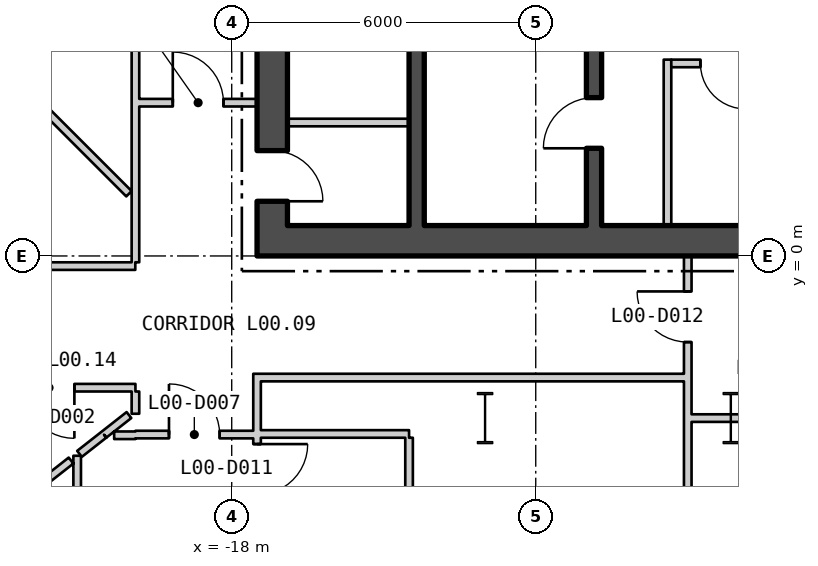
"""IFC4 building model, lengths in metres.
Left out: names, types, materials, properties, quantities, classifications, styles, units other than length and angle.
Written with IfcOpenShell. Run it as: python <this file> out.ifc"""

import sys

from ifc_helpers import new_model, si_unit, direction, frame, frame_2d, origin, origin_2d, place, context, subcontext, project, spatial, rectangle, i_section, extrude, element, fill, save


model = new_model("IFC4")
c1 = context("Model", 3, precision=1e-05, world=origin(), true_north=direction((0.0, 1.0)))
c2 = subcontext(c1, "Body", "Model", "MODEL_VIEW")
j1 = project(units=[si_unit("LENGTHUNIT", "METRE"), si_unit("PLANEANGLEUNIT", "RADIAN")], contexts=[c1])
p1 = place(None, origin())
s1 = spatial("IfcSite", under=j1, at=p1, CompositionType="ELEMENT")
p2 = place(p1, origin())
s2 = spatial("IfcBuilding", under=s1, at=p2, CompositionType="ELEMENT")
p3 = place(p2, origin())
s3 = spatial("IfcBuildingStorey", under=s2, at=p3, CompositionType="ELEMENT", Elevation=0.0)
for number, where, z_axis, x_axis in (
    (1, (-8.15, -3.2, 0.0), (0.0, 0.0, 1.0), (1.0, 0.0, 0.0)),
    (2, (-13.0, -3.2, 0.0), (0.0, 0.0, 1.0), (1.0, 0.0, 0.0)),
):
    element("IfcColumn", number, at=place(p3, frame(where, z_axis=z_axis, x_axis=x_axis)), inside=s3, PredefinedType="COLUMN", context=c2, shape_type="SweptSolid", body=[
        extrude(i_section(OverallWidth=0.302, OverallDepth=1.008, WebThickness=0.021, FlangeThickness=0.04, at=origin_2d()), origin(), (0.0, 0.0, 1.0), 8.4),
    ])
p4 = place(p3, frame((-17.5, 0.3, 0.0), z_axis=(0.0, 0.0, 1.0), x_axis=(1.0, 0.0, 0.0)))
e3 = element("IfcWall", 3, at=p4, inside=s3, PredefinedType="SHEAR", context=c2, shape_type="SweptSolid", body=[
    extrude(rectangle(XDim=35.0, YDim=0.6, at=frame_2d((17.5, 0.0))), origin(), (0.0, 0.0, 1.0), 8.18),
])
p5 = place(p4, frame((12.0, 0.0, 0.0)))
e4 = element("IfcOpeningElement", 4, at=p5, cuts=e3, PredefinedType="OPENING", context=c2, shape_type="SweptSolid", body=[
    extrude(rectangle(XDim=1.8, YDim=2.4, at=frame_2d((0.9, 1.2))), frame((0.0, 0.31, 0.0), z_axis=(0.0, -1.0, 0.0), x_axis=(1.0, 0.0, 0.0)), (0.0, 0.0, 1.0), 0.62),
])
p6 = place(p4, frame((22.0, 0.0, 0.0)))
e5 = element("IfcOpeningElement", 5, at=p6, cuts=e3, PredefinedType="OPENING", context=c2, shape_type="SweptSolid", body=[
    extrude(rectangle(XDim=1.8, YDim=2.4, at=frame_2d((0.9, 1.2))), frame((0.0, 0.31, 0.0), z_axis=(0.0, -1.0, 0.0), x_axis=(1.0, 0.0, 0.0)), (0.0, 0.0, 1.0), 0.62),
])
p7 = place(p3, frame((-17.2, 0.6, 0.0), z_axis=(0.0, 0.0, 1.0), x_axis=(0.0, 1.0, 0.0)))
e6 = element("IfcWall", 6, at=p7, inside=s3, PredefinedType="SHEAR", context=c2, shape_type="SweptSolid", body=[
    extrude(rectangle(XDim=16.8, YDim=0.6, at=frame_2d((8.4, 0.0))), origin(), (0.0, 0.0, 1.0), 8.18),
])
p8 = place(p7, frame((7.1, 0.0, 0.0)))
e7 = element("IfcOpeningElement", 7, at=p8, cuts=e6, PredefinedType="OPENING", context=c2, shape_type="SweptSolid", body=[
    extrude(rectangle(XDim=1.5, YDim=2.4, at=frame_2d((0.75, 1.2))), frame((0.0, 0.31, 0.0), z_axis=(0.0, -1.0, 0.0), x_axis=(1.0, 0.0, 0.0)), (0.0, 0.0, 1.0), 0.62),
])
p9 = place(p7, frame((9.525, 0.0, 0.0)))
e8 = element("IfcOpeningElement", 8, at=p9, cuts=e6, PredefinedType="OPENING", context=c2, shape_type="SweptSolid", body=[
    extrude(rectangle(XDim=1.5, YDim=2.4, at=frame_2d((0.75, 1.2))), frame((0.0, 0.31, 0.0), z_axis=(0.0, -1.0, 0.0), x_axis=(1.0, 0.0, 0.0)), (0.0, 0.0, 1.0), 0.62),
])
p10 = place(p7, frame((0.479, 0.0, 0.0)))
e9 = element("IfcOpeningElement", 9, at=p10, cuts=e6, PredefinedType="OPENING", context=c2, shape_type="SweptSolid", body=[
    extrude(rectangle(XDim=1.0, YDim=2.1, at=frame_2d((0.5, 1.05))), frame((0.0, 0.31, 0.0), z_axis=(0.0, -1.0, 0.0), x_axis=(1.0, 0.0, 0.0)), (0.0, 0.0, 1.0), 0.62),
])
p11 = place(p7, frame((4.079, 0.0, 0.0)))
e10 = element("IfcOpeningElement", 10, at=p11, cuts=e6, PredefinedType="OPENING", context=c2, shape_type="SweptSolid", body=[
    extrude(rectangle(XDim=0.9, YDim=2.1, at=frame_2d((0.45, 1.05))), frame((0.0, 0.31, 0.0), z_axis=(0.0, -1.0, 0.0), x_axis=(1.0, 0.0, 0.0)), (0.0, 0.0, 1.0), 0.62),
])
p12 = place(p7, frame((13.225, 0.0, 0.0)))
e11 = element("IfcOpeningElement", 11, at=p12, cuts=e6, PredefinedType="OPENING", context=c2, shape_type="SweptSolid", body=[
    extrude(rectangle(XDim=0.9, YDim=2.1, at=frame_2d((0.45, 1.05))), frame((0.0, 0.31, 0.0), z_axis=(0.0, -1.0, 0.0), x_axis=(1.0, 0.0, 0.0)), (0.0, 0.0, 1.0), 0.62),
])
p13 = place(p7, frame((15.238, 0.0, 0.0)))
e12 = element("IfcOpeningElement", 12, at=p13, cuts=e6, PredefinedType="OPENING", context=c2, shape_type="SweptSolid", body=[
    extrude(rectangle(XDim=0.9, YDim=2.1, at=frame_2d((0.45, 1.05))), frame((0.0, 0.31, 0.0), z_axis=(0.0, -1.0, 0.0), x_axis=(1.0, 0.0, 0.0)), (0.0, 0.0, 1.0), 0.62),
])
p14 = place(p3, frame((-10.85, 0.6, 0.0), z_axis=(0.0, 0.0, 1.0), x_axis=(0.0, 1.0, 0.0)))
e13 = element("IfcWall", 13, at=p14, inside=s3, PredefinedType="SHEAR", context=c2, shape_type="SweptSolid", body=[
    extrude(rectangle(XDim=16.8, YDim=0.3, at=frame_2d((8.4, 0.0))), origin(), (0.0, 0.0, 1.0), 8.18),
])
p15 = place(p14, frame((1.525, 0.0, 0.0)))
e14 = element("IfcOpeningElement", 14, at=p15, cuts=e13, PredefinedType="OPENING", context=c2, shape_type="SweptSolid", body=[
    extrude(rectangle(XDim=1.0, YDim=2.1, at=frame_2d((0.5, 1.05))), frame((0.0, 0.16, 0.0), z_axis=(0.0, -1.0, 0.0), x_axis=(1.0, 0.0, 0.0)), (0.0, 0.0, 1.0), 0.32),
])
p16 = place(p3, frame((-14.35, 0.6, 0.0), z_axis=(0.0, 0.0, 1.0), x_axis=(0.0, 1.0, 0.0)))
e15 = element("IfcWall", 15, at=p16, inside=s3, PredefinedType="SHEAR", context=c2, shape_type="SweptSolid", body=[
    extrude(rectangle(XDim=16.8, YDim=0.3, at=frame_2d((8.4, 0.0))), origin(), (0.0, 0.0, 1.0), 8.18),
])
p17 = place(p16, frame((9.25, 0.0, 0.0)))
e16 = element("IfcOpeningElement", 16, at=p17, cuts=e15, PredefinedType="OPENING", context=c2, shape_type="SweptSolid", body=[
    extrude(rectangle(XDim=1.0, YDim=2.1, at=frame_2d((0.5, 1.05))), frame((0.0, 0.16, 0.0), z_axis=(0.0, -1.0, 0.0), x_axis=(1.0, 0.0, 0.0)), (0.0, 0.0, 1.0), 0.32),
])
p18 = place(p16, frame((7.1, 0.0, 0.0)))
e17 = element("IfcOpeningElement", 17, at=p18, cuts=e15, PredefinedType="OPENING", context=c2, shape_type="SweptSolid", body=[
    extrude(rectangle(XDim=1.5, YDim=2.4, at=frame_2d((0.75, 1.2))), frame((0.0, 0.16, 0.0), z_axis=(0.0, -1.0, 0.0), x_axis=(1.0, 0.0, 0.0)), (0.0, 0.0, 1.0), 0.32),
])
p19 = place(p3, frame((-16.9, 2.634, 0.0), z_axis=(0.0, 0.0, 1.0), x_axis=(1.0, 0.0, 0.0)))
e18 = element("IfcWall", 18, at=p19, inside=s3, PredefinedType="PARTITIONING", context=c2, shape_type="SweptSolid", body=[
    extrude(rectangle(XDim=2.4, YDim=0.15, at=frame_2d((1.2, 0.0))), origin(), (0.0, 0.0, 1.0), 8.18),
])
p20 = place(p3, frame((-9.4, 0.6, 0.0), z_axis=(0.0, 0.0, 1.0), x_axis=(0.0, 1.0, 0.0)))
e19 = element("IfcWall", 19, at=p20, inside=s3, PredefinedType="PARTITIONING", context=c2, shape_type="SweptSolid", body=[
    extrude(rectangle(XDim=3.275, YDim=0.15, at=frame_2d((1.637, 0.0))), origin(), (0.0, 0.0, 1.0), 8.18),
])
p21 = place(p3, frame((-9.325, 3.8, 0.0), z_axis=(0.0, 0.0, 1.0), x_axis=(1.0, 0.0, 0.0)))
e20 = element("IfcWall", 20, at=p21, inside=s3, PredefinedType="PARTITIONING", context=c2, shape_type="SweptSolid", body=[
    extrude(rectangle(XDim=2.05, YDim=0.15, at=frame_2d((1.025, 0.0))), origin(), (0.0, 0.0, 1.0), 8.18),
])
p22 = place(p21, frame((0.575, 0.0, 0.0)))
e21 = element("IfcOpeningElement", 21, at=p22, cuts=e20, PredefinedType="OPENING", context=c2, shape_type="SweptSolid", body=[
    extrude(rectangle(XDim=0.9, YDim=2.1, at=frame_2d((0.45, 1.05))), frame((0.0, 0.085, 0.0), z_axis=(0.0, -1.0, 0.0), x_axis=(1.0, 0.0, 0.0)), (0.0, 0.0, 1.0), 0.17),
])
p23 = place(p3, frame((-26.75, -2.6, 0.0), z_axis=(0.0, 0.0, 1.0), x_axis=(1.0, 0.0, 0.0)))
e22 = element("IfcWall", 22, at=p23, inside=s3, PredefinedType="PARTITIONING", context=c2, shape_type="SweptSolid", body=[
    extrude(rectangle(XDim=6.85, YDim=0.15, at=frame_2d((3.425, 0.0))), origin(), (0.0, 0.0, 1.0), 8.18),
])
p24 = place(p23, frame((1.616, 0.0, 0.0)))
e23 = element("IfcOpeningElement", 23, at=p24, cuts=e22, PredefinedType="OPENING", context=c2, shape_type="SweptSolid", body=[
    extrude(rectangle(XDim=1.0, YDim=2.1, at=frame_2d((0.5, 1.05))), frame((0.0, 0.085, 0.0), z_axis=(0.0, -1.0, 0.0), x_axis=(1.0, 0.0, 0.0)), (0.0, 0.0, 1.0), 0.17),
])
p25 = place(p23, frame((4.645, 0.0, 0.0)))
e24 = element("IfcOpeningElement", 24, at=p25, cuts=e22, PredefinedType="OPENING", context=c2, shape_type="SweptSolid", body=[
    extrude(rectangle(XDim=1.0, YDim=2.1, at=frame_2d((0.5, 1.05))), frame((0.0, 0.085, 0.0), z_axis=(0.0, -1.0, 0.0), x_axis=(1.0, 0.0, 0.0)), (0.0, 0.0, 1.0), 0.17),
])
p26 = place(p3, frame((-25.425, -0.2, 0.0), z_axis=(0.0, 0.0, 1.0), x_axis=(1.0, 0.0, 0.0)))
e25 = element("IfcWall", 25, at=p26, inside=s3, PredefinedType="PARTITIONING", context=c2, shape_type="SweptSolid", body=[
    extrude(rectangle(XDim=5.522, YDim=0.15, at=frame_2d((2.761, 0.0))), origin(), (0.0, 0.0, 1.0), 8.18),
])
p27 = place(p26, frame((0.2, 0.0, 0.0)))
e26 = element("IfcOpeningElement", 26, at=p27, cuts=e25, PredefinedType="OPENING", context=c2, shape_type="SweptSolid", body=[
    extrude(rectangle(XDim=1.8, YDim=2.1, at=frame_2d((0.9, 1.05))), frame((0.0, 0.085, 0.0), z_axis=(0.0, -1.0, 0.0), x_axis=(1.0, 0.0, 0.0)), (0.0, 0.0, 1.0), 0.17),
])
p28 = place(p3, frame((-25.392, 6.592, 0.0), z_axis=(0.0, 0.0, 1.0), x_axis=(0.707106781187, -0.707106781187, 0.0)))
e27 = element("IfcWall", 27, at=p28, inside=s3, PredefinedType="PARTITIONING", context=c2, shape_type="SweptSolid", body=[
    extrude(rectangle(XDim=7.586, YDim=0.15, at=frame_2d((3.793, 0.0))), origin(), (0.0, 0.0, 1.0), 8.18),
])
p29 = place(p3, frame((-24.745, -6.846, 0.0), z_axis=(0.0, 0.0, 1.0), x_axis=(0.786333607762, 0.617802118242, 0.0)))
e28 = element("IfcWall", 28, at=p29, inside=s3, PredefinedType="PARTITIONING", context=c2, shape_type="SweptSolid", body=[
    extrude(rectangle(XDim=4.545, YDim=0.15, at=frame_2d((2.273, 0.0))), origin(), (0.0, 0.0, 1.0), 8.18),
])
p30 = place(p3, frame((-21.05, -14.803, 0.0), z_axis=(0.0, 0.0, 1.0), x_axis=(0.0, 1.0, 0.0)))
e29 = element("IfcWall", 29, at=p30, inside=s3, PredefinedType="PARTITIONING", context=c2, shape_type="SweptSolid", body=[
    extrude(rectangle(XDim=10.86, YDim=0.15, at=frame_2d((5.43, 0.0))), origin(), (0.0, 0.0, 1.0), 8.18),
])
p31 = place(p30, frame((4.392, 0.0, 0.0)))
e30 = element("IfcOpeningElement", 30, at=p31, cuts=e29, PredefinedType="OPENING", context=c2, shape_type="SweptSolid", body=[
    extrude(rectangle(XDim=1.8, YDim=2.1, at=frame_2d((0.9, 1.05))), frame((0.0, 0.085, 0.0), z_axis=(0.0, -1.0, 0.0), x_axis=(1.0, 0.0, 0.0)), (0.0, 0.0, 1.0), 0.17),
])
p32 = place(p3, frame((-21.004, -3.906, 0.0), z_axis=(0.0, 0.0, 1.0), x_axis=(0.786713818429, 0.61731788237, 0.0)))
e31 = element("IfcWall", 31, at=p32, inside=s3, PredefinedType="PARTITIONING", context=c2, shape_type="SweptSolid", body=[
    extrude(rectangle(XDim=0.614, YDim=0.15, at=frame_2d((0.307, 0.0))), origin(), (0.0, 0.0, 1.0), 8.18),
])
p33 = place(p3, frame((-20.521, -3.527, 0.0), z_axis=(0.0, 0.0, 1.0), x_axis=(0.786595086438, 0.617469165216, 0.0)))
e32 = element("IfcWall", 32, at=p33, inside=s3, PredefinedType="PARTITIONING", context=c2, shape_type="SweptSolid", body=[
    extrude(rectangle(XDim=0.627, YDim=0.15, at=frame_2d((0.313, 0.0))), origin(), (0.0, 0.0, 1.0), 8.18),
])
p34 = place(p3, frame((-20.32, -3.539, 0.0), z_axis=(0.0, 0.0, 1.0), x_axis=(1.0, 0.0, 0.0)))
e33 = element("IfcWall", 33, at=p34, inside=s3, PredefinedType="PARTITIONING", context=c2, shape_type="SweptSolid", body=[
    extrude(rectangle(XDim=0.42, YDim=0.15, at=frame_2d((0.21, 0.0))), origin(), (0.0, 0.0, 1.0), 8.18),
])
p35 = place(p3, frame((-19.9, -3.525, 0.0), z_axis=(0.0, 0.0, 1.0), x_axis=(1.0, 0.0, 0.0)))
e34 = element("IfcWall", 34, at=p35, inside=s3, PredefinedType="PARTITIONING", context=c2, shape_type="SweptSolid", body=[
    extrude(rectangle(XDim=2.325, YDim=0.15, at=frame_2d((1.163, 0.0))), origin(), (0.0, 0.0, 1.0), 8.18),
])
p36 = place(p35, frame((0.662, 0.0, 0.0)))
e35 = element("IfcOpeningElement", 35, at=p36, cuts=e34, PredefinedType="OPENING", context=c2, shape_type="SweptSolid", body=[
    extrude(rectangle(XDim=1.0, YDim=2.1, at=frame_2d((0.5, 1.05))), frame((0.0, 0.085, 0.0), z_axis=(0.0, -1.0, 0.0), x_axis=(1.0, 0.0, 0.0)), (0.0, 0.0, 1.0), 0.17),
])
p37 = place(p3, frame((-19.9, -3.114, 0.0), z_axis=(0.0, 0.0, 1.0), x_axis=(0.0, 1.0, 0.0)))
e36 = element("IfcWall", 36, at=p37, inside=s3, PredefinedType="PARTITIONING", context=c2, shape_type="SweptSolid", body=[
    extrude(rectangle(XDim=0.439, YDim=0.15, at=frame_2d((0.22, 0.0))), origin(), (0.0, 0.0, 1.0), 8.18),
])
p38 = place(p3, frame((-19.9, -0.125, 0.0), z_axis=(0.0, 0.0, 1.0), x_axis=(0.0, 1.0, 0.0)))
e37 = element("IfcWall", 37, at=p38, inside=s3, PredefinedType="PARTITIONING", context=c2, shape_type="SweptSolid", body=[
    extrude(rectangle(XDim=1.15, YDim=0.15, at=frame_2d((0.575, 0.0))), origin(), (0.0, 0.0, 1.0), 8.18),
])
p39 = place(p3, frame((-19.9, 1.025, 0.0), z_axis=(0.0, 0.0, 1.0), x_axis=(0.0, 1.0, 0.0)))
e38 = element("IfcWall", 38, at=p39, inside=s3, PredefinedType="PARTITIONING", context=c2, shape_type="SweptSolid", body=[
    extrude(rectangle(XDim=18.935, YDim=0.15, at=frame_2d((9.467, 0.0))), origin(), (0.0, 0.0, 1.0), 8.18),
])
p40 = place(p39, frame((9.506, 0.0, 0.0)))
e39 = element("IfcOpeningElement", 39, at=p40, cuts=e38, PredefinedType="OPENING", context=c2, shape_type="SweptSolid", body=[
    extrude(rectangle(XDim=1.0, YDim=2.1, at=frame_2d((0.5, 1.05))), frame((0.0, 0.085, 0.0), z_axis=(0.0, -1.0, 0.0), x_axis=(1.0, 0.0, 0.0)), (0.0, 0.0, 1.0), 0.17),
])
p41 = place(p3, frame((-19.825, 3.025, 0.0), z_axis=(0.0, 0.0, 1.0), x_axis=(1.0, 0.0, 0.0)))
e40 = element("IfcWall", 40, at=p41, inside=s3, PredefinedType="PARTITIONING", context=c2, shape_type="SweptSolid", body=[
    extrude(rectangle(XDim=2.325, YDim=0.15, at=frame_2d((1.163, 0.0))), origin(), (0.0, 0.0, 1.0), 7.63),
])
p42 = place(p41, frame((0.662, 0.0, 0.0)))
e41 = element("IfcOpeningElement", 41, at=p42, cuts=e40, PredefinedType="OPENING", context=c2, shape_type="SweptSolid", body=[
    extrude(rectangle(XDim=1.0, YDim=2.1, at=frame_2d((0.5, 1.05))), frame((0.0, 0.085, 0.0), z_axis=(0.0, -1.0, 0.0), x_axis=(1.0, 0.0, 0.0)), (0.0, 0.0, 1.0), 0.17),
])
p43 = place(p3, frame((-17.5, -21.296, 0.0), z_axis=(0.0, 0.0, 1.0), x_axis=(0.0, 1.0, 0.0)))
e42 = element("IfcWall", 42, at=p43, inside=s3, PredefinedType="PARTITIONING", context=c2, shape_type="SweptSolid", body=[
    extrude(rectangle(XDim=18.971, YDim=0.15, at=frame_2d((9.486, 0.0))), origin(), (0.0, 0.0, 1.0), 8.18),
])
p44 = place(p43, frame((0.2, 0.0, 0.0)))
e43 = element("IfcOpeningElement", 43, at=p44, cuts=e42, PredefinedType="OPENING", context=c2, shape_type="SweptSolid", body=[
    extrude(rectangle(XDim=1.0, YDim=2.1, at=frame_2d((0.5, 1.05))), frame((0.0, 0.085, 0.0), z_axis=(0.0, -1.0, 0.0), x_axis=(1.0, 0.0, 0.0)), (0.0, 0.0, 1.0), 0.17),
])
p45 = place(p43, frame((16.583, 0.0, 0.0)))
e44 = element("IfcOpeningElement", 44, at=p45, cuts=e42, PredefinedType="OPENING", context=c2, shape_type="SweptSolid", body=[
    extrude(rectangle(XDim=1.0, YDim=2.1, at=frame_2d((0.5, 1.05))), frame((0.0, 0.085, 0.0), z_axis=(0.0, -1.0, 0.0), x_axis=(1.0, 0.0, 0.0)), (0.0, 0.0, 1.0), 0.17),
])
p46 = place(p3, frame((-17.425, -3.513, 0.0), z_axis=(0.0, 0.0, 1.0), x_axis=(1.0, 0.0, 0.0)))
e45 = element("IfcWall", 45, at=p46, inside=s3, PredefinedType="PARTITIONING", context=c2, shape_type="SweptSolid", body=[
    extrude(rectangle(XDim=2.925, YDim=0.15, at=frame_2d((1.462, 0.0))), origin(), (0.0, 0.0, 1.0), 8.18),
])
p47 = place(p3, frame((-17.425, -2.4, 0.0), z_axis=(0.0, 0.0, 1.0), x_axis=(1.0, 0.0, 0.0)))
e46 = element("IfcWall", 46, at=p47, inside=s3, PredefinedType="PARTITIONING", context=c2, shape_type="SweptSolid", body=[
    extrude(rectangle(XDim=8.35, YDim=0.15, at=frame_2d((4.175, 0.0))), origin(), (0.0, 0.0, 1.0), 8.18),
])
p48 = place(p3, frame((-14.5, -6.438, 0.0), z_axis=(0.0, 0.0, 1.0), x_axis=(0.0, 1.0, 0.0)))
e47 = element("IfcWall", 47, at=p48, inside=s3, PredefinedType="PARTITIONING", context=c2, shape_type="SweptSolid", body=[
    extrude(rectangle(XDim=2.85, YDim=0.15, at=frame_2d((1.425, 0.0))), origin(), (0.0, 0.0, 1.0), 8.18),
])
p49 = place(p3, frame((-9.0, -13.675, 0.0), z_axis=(0.0, 0.0, 1.0), x_axis=(0.0, 1.0, 0.0)))
e48 = element("IfcWall", 48, at=p49, inside=s3, PredefinedType="PARTITIONING", context=c2, shape_type="SweptSolid", body=[
    extrude(rectangle(XDim=13.675, YDim=0.15, at=frame_2d((6.838, 0.0))), origin(), (0.0, 0.0, 1.0), 8.18),
])
p50 = place(p49, frame((11.975, 0.0, 0.0)))
e49 = element("IfcOpeningElement", 49, at=p50, cuts=e48, PredefinedType="OPENING", context=c2, shape_type="SweptSolid", body=[
    extrude(rectangle(XDim=1.0, YDim=2.1, at=frame_2d((0.5, 1.05))), frame((0.0, 0.085, 0.0), z_axis=(0.0, -1.0, 0.0), x_axis=(1.0, 0.0, 0.0)), (0.0, 0.0, 1.0), 0.17),
])
p51 = place(p3, frame((-8.925, -3.2, 0.0), z_axis=(0.0, 0.0, 1.0), x_axis=(1.0, 0.0, 0.0)))
e50 = element("IfcWall", 50, at=p51, inside=s3, PredefinedType="PARTITIONING", context=c2, shape_type="SweptSolid", body=[
    extrude(rectangle(XDim=0.775, YDim=0.15, at=frame_2d((0.388, 0.0))), origin(), (0.0, 0.0, 1.0), 7.39),
])
p52 = place(p3, frame((-8.15, -3.2, 0.0), z_axis=(0.0, 0.0, 1.0), x_axis=(1.0, 0.0, 0.0)))
e51 = element("IfcWall", 51, at=p52, inside=s3, PredefinedType="PARTITIONING", context=c2, shape_type="SweptSolid", body=[
    extrude(rectangle(XDim=2.225, YDim=0.15, at=frame_2d((1.113, 0.0))), origin(), (0.0, 0.0, 1.0), 7.27),
])
p53 = place(p52, frame((0.513, 0.0, 0.0)))
e52 = element("IfcOpeningElement", 52, at=p53, cuts=e51, PredefinedType="OPENING", context=c2, shape_type="SweptSolid", body=[
    extrude(rectangle(XDim=1.0, YDim=2.1, at=frame_2d((0.5, 1.05))), frame((0.0, 0.085, 0.0), z_axis=(0.0, -1.0, 0.0), x_axis=(1.0, 0.0, 0.0)), (0.0, 0.0, 1.0), 0.17),
])
p54 = place(p15, origin())
e53 = element("IfcDoor", 53, at=p54, inside=s3, OperationType="SINGLE_SWING_RIGHT", PredefinedType="DOOR", context=c2, shape_type="SweptSolid", body=[
    extrude(rectangle(XDim=1.0, YDim=2.1, at=frame_2d((0.5, 1.05))), frame((0.0, 0.025, 0.0), z_axis=(0.0, -1.0, 0.0), x_axis=(1.0, 0.0, 0.0)), (0.0, 0.0, 1.0), 0.05),
])
fill(e14, e53)
p55 = place(p10, origin())
e54 = element("IfcDoor", 54, at=p55, inside=s3, OperationType="SINGLE_SWING_LEFT", PredefinedType="DOOR", context=c2, shape_type="SweptSolid", body=[
    extrude(rectangle(XDim=1.0, YDim=2.1, at=frame_2d((0.5, 1.05))), frame((0.0, 0.025, 0.0), z_axis=(0.0, -1.0, 0.0), x_axis=(1.0, 0.0, 0.0)), (0.0, 0.0, 1.0), 0.05),
])
fill(e9, e54)
p56 = place(p22, origin())
e55 = element("IfcDoor", 55, at=p56, inside=s3, OperationType="SINGLE_SWING_RIGHT", PredefinedType="DOOR", context=c2, shape_type="SweptSolid", body=[
    extrude(rectangle(XDim=0.9, YDim=2.1, at=frame_2d((0.45, 1.05))), frame((0.0, 0.025, 0.0), z_axis=(0.0, -1.0, 0.0), x_axis=(1.0, 0.0, 0.0)), (0.0, 0.0, 1.0), 0.05),
])
fill(e21, e55)
p57 = place(p25, origin())
e56 = element("IfcDoor", 56, at=p57, inside=s3, OperationType="SINGLE_SWING_RIGHT", PredefinedType="DOOR", context=c2, shape_type="SweptSolid", body=[
    extrude(rectangle(XDim=1.0, YDim=2.1, at=frame_2d((0.5, 1.05))), frame((0.0, 0.025, 0.0), z_axis=(0.0, -1.0, 0.0), x_axis=(1.0, 0.0, 0.0)), (0.0, 0.0, 1.0), 0.05),
])
fill(e24, e56)
p58 = place(p36, origin())
e57 = element("IfcDoor", 57, at=p58, inside=s3, OperationType="SINGLE_SWING_RIGHT", PredefinedType="DOOR", context=c2, shape_type="SweptSolid", body=[
    extrude(rectangle(XDim=1.0, YDim=2.1, at=frame_2d((0.5, 1.05))), frame((0.0, 0.025, 0.0), z_axis=(0.0, -1.0, 0.0), x_axis=(1.0, 0.0, 0.0)), (0.0, 0.0, 1.0), 0.05),
])
fill(e35, e57)
p59 = place(p42, origin())
e58 = element("IfcDoor", 58, at=p59, inside=s3, OperationType="SINGLE_SWING_RIGHT", PredefinedType="DOOR", context=c2, shape_type="SweptSolid", body=[
    extrude(rectangle(XDim=1.0, YDim=2.1, at=frame_2d((0.5, 1.05))), frame((0.0, 0.025, 0.0), z_axis=(0.0, -1.0, 0.0), x_axis=(1.0, 0.0, 0.0)), (0.0, 0.0, 1.0), 0.05),
])
fill(e41, e58)
p60 = place(p45, origin())
e59 = element("IfcDoor", 59, at=p60, inside=s3, OperationType="SINGLE_SWING_RIGHT", PredefinedType="DOOR", context=c2, shape_type="SweptSolid", body=[
    extrude(rectangle(XDim=1.0, YDim=2.1, at=frame_2d((0.5, 1.05))), frame((0.0, 0.025, 0.0), z_axis=(0.0, -1.0, 0.0), x_axis=(1.0, 0.0, 0.0)), (0.0, 0.0, 1.0), 0.05),
])
fill(e44, e59)
p61 = place(p50, origin())
e60 = element("IfcDoor", 60, at=p61, inside=s3, OperationType="SINGLE_SWING_LEFT", PredefinedType="DOOR", context=c2, shape_type="SweptSolid", body=[
    extrude(rectangle(XDim=1.0, YDim=2.1, at=frame_2d((0.5, 1.05))), frame((0.0, 0.025, 0.0), z_axis=(0.0, -1.0, 0.0), x_axis=(1.0, 0.0, 0.0)), (0.0, 0.0, 1.0), 0.05),
])
fill(e49, e60)
save(model, sys.argv[1])
